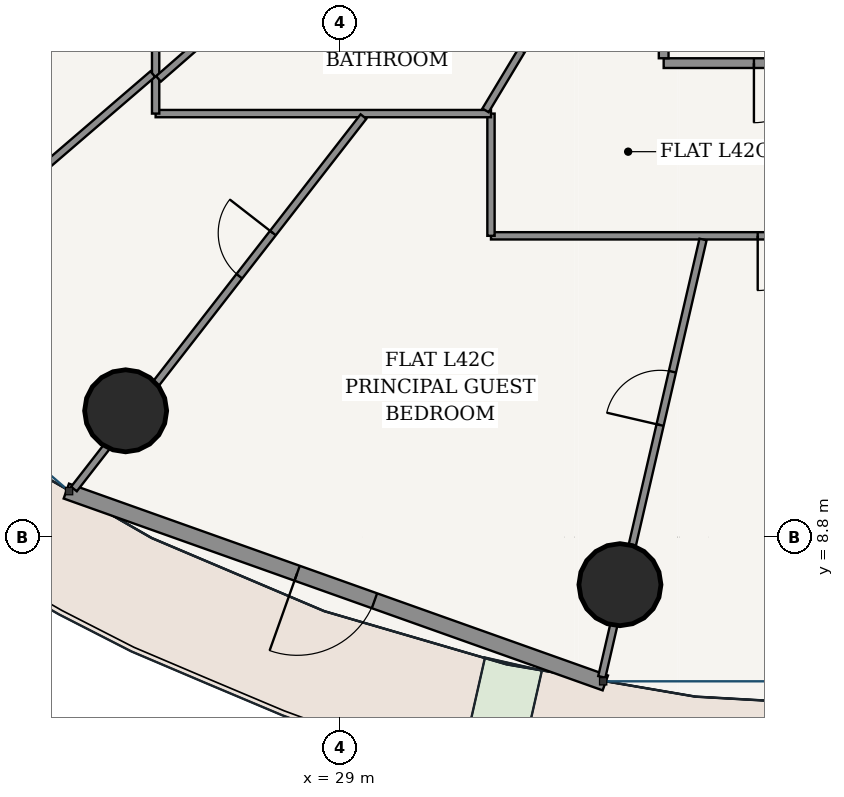
"""IFC4 building model, lengths in metres.
Left out: names, types, materials, properties, quantities, classifications, styles, units other than length and angle.
Written with IfcOpenShell. Run it as: python <this file> out.ifc"""

import sys

from ifc_helpers import new_model, si_unit, direction, frame, frame_2d, origin, origin_2d, place, context, subcontext, project, spatial, rectangle, hollow_circle, extrude, source, transform, mapped, element, fill, save


model = new_model("IFC4")
c1 = context("Model", 3, precision=1e-05, world=origin(), true_north=direction((-0.2419218956, 0.970295726276)))
c2 = subcontext(c1, "Body", "Model", "MODEL_VIEW")
j1 = project(units=[si_unit("LENGTHUNIT", "METRE"), si_unit("PLANEANGLEUNIT", "RADIAN")], contexts=[c1])
p1 = place(None, origin())
s1 = spatial("IfcSite", under=j1, at=p1, CompositionType="ELEMENT")
p2 = place(p1, origin())
s2 = spatial("IfcBuilding", under=s1, at=p2, CompositionType="ELEMENT")
p3 = place(p2, frame((0.0, 0.0, 160.6)))
s3 = spatial("IfcBuildingStorey", under=s2, at=p3, CompositionType="ELEMENT", Elevation=160.6)
for number, where, z_axis, x_axis in (
    (1, (25.472, 10.877, 0.0), (0.0, 0.0, 1.0), (1.0, 0.0, 0.0)),
    (2, (33.601, 8.018, 0.0), (0.0, 0.0, 1.0), (1.0, 0.0, 0.0)),
):
    element("IfcColumn", number, at=place(p3, frame(where, z_axis=z_axis, x_axis=x_axis)), inside=s3, PredefinedType="COLUMN", context=c2, shape_type="SweptSolid", body=[
        extrude(hollow_circle(Radius=0.675, WallThickness=0.042, at=origin_2d()), origin(), (0.0, 0.0, 1.0), 3.6),
    ])
p4 = place(p3, frame((24.497, 9.557, 0.0), z_axis=(0.0, 0.0, 1.0), x_axis=(0.942103604331, -0.335321932934, 0.0)))
e3 = element("IfcWall", 3, at=p4, inside=s3, PredefinedType="SOLIDWALL", context=c2, shape_type="SweptSolid", body=[
    extrude(rectangle(XDim=9.408, YDim=0.26, at=frame_2d((4.704, 0.0))), origin(), (0.0, 0.0, 1.0), 3.33),
])
p5 = place(p4, frame((4.029, 0.0, 0.0)))
e4 = element("IfcOpeningElement", 4, at=p5, cuts=e3, PredefinedType="OPENING", context=c2, shape_type="SweptSolid", body=[
    extrude(rectangle(XDim=1.35, YDim=2.2, at=frame_2d((0.675, 1.1))), frame((0.0, 0.14, 0.0), z_axis=(0.0, -1.0, 0.0), x_axis=(1.0, 0.0, 0.0)), (0.0, 0.0, 1.0), 0.28),
])
p6 = place(p3, frame((34.32, 16.595, 0.0), z_axis=(0.0, 0.0, 1.0), x_axis=(1.0, 0.0, 0.0)))
e5 = element("IfcWall", 5, at=p6, inside=s3, PredefinedType="PARTITIONING", context=c2, shape_type="SweptSolid", body=[
    extrude(rectangle(XDim=14.885, YDim=0.16, at=frame_2d((7.442, 0.0))), origin(), (0.0, 0.0, 1.0), 2.776),
])
p7 = place(p6, frame((1.484, 0.0, 0.0)))
e6 = element("IfcOpeningElement", 6, at=p7, cuts=e5, PredefinedType="OPENING", context=c2, shape_type="SweptSolid", body=[
    extrude(rectangle(XDim=0.98, YDim=2.2, at=frame_2d((0.49, 1.1))), frame((0.0, 0.09, 0.0), z_axis=(0.0, -1.0, 0.0), x_axis=(1.0, 0.0, 0.0)), (0.0, 0.0, 1.0), 0.18),
])
p8 = place(p6, frame((10.741, 0.0, 0.0)))
e7 = element("IfcOpeningElement", 7, at=p8, cuts=e5, PredefinedType="OPENING", context=c2, shape_type="SweptSolid", body=[
    extrude(rectangle(XDim=0.98, YDim=2.2, at=frame_2d((0.49, 1.1))), frame((0.0, 0.09, 0.0), z_axis=(0.0, -1.0, 0.0), x_axis=(1.0, 0.0, 0.0)), (0.0, 0.0, 1.0), 0.18),
])
p9 = place(p3, frame((34.32, 16.675, 0.0), z_axis=(0.0, 0.0, 1.0), x_axis=(0.0, 1.0, 0.0)))
e8 = element("IfcWall", 8, at=p9, inside=s3, PredefinedType="PARTITIONING", context=c2, shape_type="SweptSolid", body=[
    extrude(rectangle(XDim=1.85, YDim=0.16, at=frame_2d((0.925, 0.0))), origin(), (0.0, 0.0, 1.0), 3.33),
])
p10 = place(p3, frame((37.898, 13.755, 0.0), z_axis=(0.0, 0.0, 1.0), x_axis=(-1.0, 0.0, 0.0)))
e9 = element("IfcWall", 9, at=p10, inside=s3, PredefinedType="PARTITIONING", context=c2, shape_type="SweptSolid", body=[
    extrude(rectangle(XDim=6.418, YDim=0.12, at=frame_2d((3.209, 0.0))), origin(), (0.0, 0.0, 1.0), 2.776),
])
p11 = place(p10, frame((1.132, 0.0, 0.0)))
e10 = element("IfcOpeningElement", 10, at=p11, cuts=e9, PredefinedType="OPENING", context=c2, shape_type="SweptSolid", body=[
    extrude(rectangle(XDim=0.9, YDim=2.15, at=frame_2d((0.45, 1.075))), frame((0.0, 0.07, 0.0), z_axis=(0.0, -1.0, 0.0), x_axis=(1.0, 0.0, 0.0)), (0.0, 0.0, 1.0), 0.14),
])
p12 = place(p3, frame((31.48, 13.755, 0.0), z_axis=(0.0, 0.0, 1.0), x_axis=(0.0, 1.0, 0.0)))
e11 = element("IfcWall", 11, at=p12, inside=s3, PredefinedType="PARTITIONING", context=c2, shape_type="SweptSolid", body=[
    extrude(rectangle(XDim=2.01, YDim=0.12, at=frame_2d((1.005, 0.0))), origin(), (0.0, 0.0, 1.0), 3.005),
])
p13 = place(p3, frame((31.48, 15.765, 0.0), z_axis=(0.0, 0.0, 1.0), x_axis=(-1.0, 0.0, 0.0)))
e12 = element("IfcWall", 12, at=p13, inside=s3, PredefinedType="PARTITIONING", context=c2, shape_type="SweptSolid", body=[
    extrude(rectangle(XDim=5.515, YDim=0.12, at=frame_2d((2.757, 0.0))), origin(), (0.0, 0.0, 1.0), 2.776),
])
p14 = place(p3, frame((25.965, 15.765, 0.0), z_axis=(0.0, 0.0, 1.0), x_axis=(0.0, 1.0, 0.0)))
e13 = element("IfcWall", 13, at=p14, inside=s3, PredefinedType="PARTITIONING", context=c2, shape_type="SweptSolid", body=[
    extrude(rectangle(XDim=5.715, YDim=0.12, at=frame_2d((2.857, 0.0))), origin(), (0.0, 0.0, 1.0), 2.776),
])
p15 = place(p14, frame((1.919, 0.0, 0.0)))
e14 = element("IfcOpeningElement", 14, at=p15, cuts=e13, PredefinedType="OPENING", context=c2, shape_type="SweptSolid", body=[
    extrude(rectangle(XDim=0.9, YDim=2.15, at=frame_2d((0.45, 1.075))), frame((0.0, 0.07, 0.0), z_axis=(0.0, -1.0, 0.0), x_axis=(1.0, 0.0, 0.0)), (0.0, 0.0, 1.0), 0.14),
])
p16 = place(p3, frame((25.911, 19.857, 0.0), z_axis=(0.0, 0.0, 1.0), x_axis=(-0.867160939672, -0.498028015986, 0.0)))
e15 = element("IfcWall", 15, at=p16, inside=s3, PredefinedType="PARTITIONING", context=c2, shape_type="SweptSolid", body=[
    extrude(rectangle(XDim=9.152, YDim=0.12, at=frame_2d((4.576, 0.0))), origin(), (0.0, 0.0, 1.0), 2.776),
])
p17 = place(p16, frame((3.124, 0.0, 0.0)))
e16 = element("IfcOpeningElement", 16, at=p17, cuts=e15, PredefinedType="OPENING", context=c2, shape_type="SweptSolid", body=[
    extrude(rectangle(XDim=0.9, YDim=2.15, at=frame_2d((0.45, 1.075))), frame((0.0, 0.07, 0.0), z_axis=(0.0, -1.0, 0.0), x_axis=(1.0, 0.0, 0.0)), (0.0, 0.0, 1.0), 0.14),
])
p18 = place(p3, frame((25.918, 16.416, 0.0), z_axis=(0.0, 0.0, 1.0), x_axis=(-0.758356041353, -0.651840559142, 0.0)))
e17 = element("IfcWall", 17, at=p18, inside=s3, PredefinedType="PARTITIONING", context=c2, shape_type="SweptSolid", body=[
    extrude(rectangle(XDim=6.569, YDim=0.12, at=frame_2d((3.285, 0.0))), origin(), (0.0, 0.0, 1.0), 2.846),
])
p19 = place(p18, frame((2.834, 0.0, 0.0)))
e18 = element("IfcOpeningElement", 18, at=p19, cuts=e17, PredefinedType="OPENING", context=c2, shape_type="SweptSolid", body=[
    extrude(rectangle(XDim=0.9, YDim=2.15, at=frame_2d((0.45, 1.075))), frame((0.0, 0.07, 0.0), z_axis=(0.0, -1.0, 0.0), x_axis=(1.0, 0.0, 0.0)), (0.0, 0.0, 1.0), 0.14),
])
p20 = place(p3, frame((29.383, 15.716, 0.0), z_axis=(0.0, 0.0, 1.0), x_axis=(-0.613751061882, -0.789499609904, 0.0)))
e19 = element("IfcWall", 19, at=p20, inside=s3, PredefinedType="PARTITIONING", context=c2, shape_type="SweptSolid", body=[
    extrude(rectangle(XDim=7.758, YDim=0.12, at=frame_2d((3.879, 0.0))), origin(), (0.0, 0.0, 1.0), 2.776),
])
p21 = place(p20, frame((2.426, 0.0, 0.0)))
e20 = element("IfcOpeningElement", 20, at=p21, cuts=e19, PredefinedType="OPENING", context=c2, shape_type="SweptSolid", body=[
    extrude(rectangle(XDim=0.9, YDim=2.15, at=frame_2d((0.45, 1.075))), frame((0.0, 0.07, 0.0), z_axis=(0.0, -1.0, 0.0), x_axis=(1.0, 0.0, 0.0)), (0.0, 0.0, 1.0), 0.14),
])
p22 = place(p3, frame((34.967, 13.695, 0.0), z_axis=(0.0, 0.0, 1.0), x_axis=(-0.225458405801, -0.974252794327, 0.0)))
e21 = element("IfcWall", 21, at=p22, inside=s3, PredefinedType="PARTITIONING", context=c2, shape_type="SweptSolid", body=[
    extrude(rectangle(XDim=7.383, YDim=0.12, at=frame_2d((3.691, 0.0))), origin(), (0.0, 0.0, 1.0), 2.776),
])
p23 = place(p22, frame((2.232, 0.0, 0.0)))
e22 = element("IfcOpeningElement", 22, at=p23, cuts=e21, PredefinedType="OPENING", context=c2, shape_type="SweptSolid", body=[
    extrude(rectangle(XDim=0.9, YDim=2.15, at=frame_2d((0.45, 1.075))), frame((0.0, 0.07, 0.0), z_axis=(0.0, -1.0, 0.0), x_axis=(1.0, 0.0, 0.0)), (0.0, 0.0, 1.0), 0.14),
])
p24 = place(p3, frame((28.588, 18.585, 0.0), z_axis=(0.0, 0.0, 1.0), x_axis=(-0.753380933673, -0.657584343471, 0.0)))
e23 = element("IfcWall", 23, at=p24, inside=s3, PredefinedType="PARTITIONING", context=c2, shape_type="SweptSolid", body=[
    extrude(rectangle(XDim=3.42, YDim=0.12, at=frame_2d((1.71, 0.0))), origin(), (0.0, 0.0, 1.0), 3.005),
])
p25 = place(p3, frame((33.02, 18.525, 0.0), z_axis=(0.0, 0.0, 1.0), x_axis=(-0.515677168, -0.856782970421, 0.0)))
e24 = element("IfcWall", 24, at=p25, inside=s3, PredefinedType="PARTITIONING", context=c2, shape_type="SweptSolid", body=[
    extrude(rectangle(XDim=3.159, YDim=0.12, at=frame_2d((1.58, 0.0))), origin(), (0.0, 0.0, 1.0), 3.33),
])
p26 = place(p25, frame((1.15, 0.0, 0.0)))
e25 = element("IfcOpeningElement", 25, at=p26, cuts=e24, PredefinedType="OPENING", context=c2, shape_type="SweptSolid", body=[
    extrude(rectangle(XDim=0.86, YDim=2.15, at=frame_2d((0.43, 1.075))), frame((0.0, 0.07, 0.0), z_axis=(0.0, -1.0, 0.0), x_axis=(1.0, 0.0, 0.0)), (0.0, 0.0, 1.0), 0.14),
])
m1 = source(origin(), c2, "Body", "SweptSolid", [
    extrude(rectangle(XDim=1.35, YDim=2.2, at=frame_2d((0.675, 1.1))), frame((0.0, 0.025, 0.0), z_axis=(0.0, -1.0, 0.0), x_axis=(1.0, 0.0, 0.0)), (0.0, 0.0, 1.0), 0.05),
])
p27 = place(p5, frame((1.35, 0.0, 0.0), z_axis=(0.0, 0.0, 1.0), x_axis=(-1.0, 0.0, 0.0)))
e26 = element("IfcDoor", 26, at=p27, inside=s3, OperationType="SINGLE_SWING_RIGHT", PredefinedType="DOOR", context=c2, shape_type="MappedRepresentation", body=[
    mapped(m1, transform((0.0, 0.0, 0.0), scale=1.0)),
])
fill(e4, e26)
m2 = source(origin(), c2, "Body", "SweptSolid", [
    extrude(rectangle(XDim=0.98, YDim=2.2, at=frame_2d((0.49, 1.1))), frame((0.0, 0.025, 0.0), z_axis=(0.0, -1.0, 0.0), x_axis=(1.0, 0.0, 0.0)), (0.0, 0.0, 1.0), 0.05),
])
p28 = place(p7, frame((0.98, 0.0, 0.0), z_axis=(0.0, 0.0, 1.0), x_axis=(-1.0, 0.0, 0.0)))
e27 = element("IfcDoor", 27, at=p28, inside=s3, OperationType="SINGLE_SWING_RIGHT", PredefinedType="DOOR", context=c2, shape_type="MappedRepresentation", body=[
    mapped(m2, transform((0.0, 0.0, 0.0), scale=1.0)),
])
fill(e6, e27)
m3 = source(origin(), c2, "Body", "SweptSolid", [
    extrude(rectangle(XDim=0.9, YDim=2.15, at=frame_2d((0.45, 1.075))), frame((0.0, 0.025, 0.0), z_axis=(0.0, -1.0, 0.0), x_axis=(1.0, 0.0, 0.0)), (0.0, 0.0, 1.0), 0.05),
])
p29 = place(p11, origin())
e28 = element("IfcDoor", 28, at=p29, inside=s3, OperationType="SINGLE_SWING_RIGHT", PredefinedType="DOOR", context=c2, shape_type="MappedRepresentation", body=[
    mapped(m3, transform((0.0, 0.0, 0.0), scale=1.0)),
])
fill(e10, e28)
p30 = place(p23, frame((0.9, 0.0, 0.0), z_axis=(0.0, 0.0, 1.0), x_axis=(-1.0, 0.0, 0.0)))
e29 = element("IfcDoor", 29, at=p30, inside=s3, OperationType="SINGLE_SWING_LEFT", PredefinedType="DOOR", context=c2, shape_type="MappedRepresentation", body=[
    mapped(m3, transform((0.0, 0.0, 0.0), scale=1.0)),
])
fill(e22, e29)
p31 = place(p21, frame((0.9, 0.0, 0.0), z_axis=(0.0, 0.0, 1.0), x_axis=(-1.0, 0.0, 0.0)))
e30 = element("IfcDoor", 30, at=p31, inside=s3, OperationType="SINGLE_SWING_RIGHT", PredefinedType="DOOR", context=c2, shape_type="MappedRepresentation", body=[
    mapped(m3, transform((0.0, 0.0, 0.0), scale=1.0)),
])
fill(e20, e30)
save(model, sys.argv[1])
